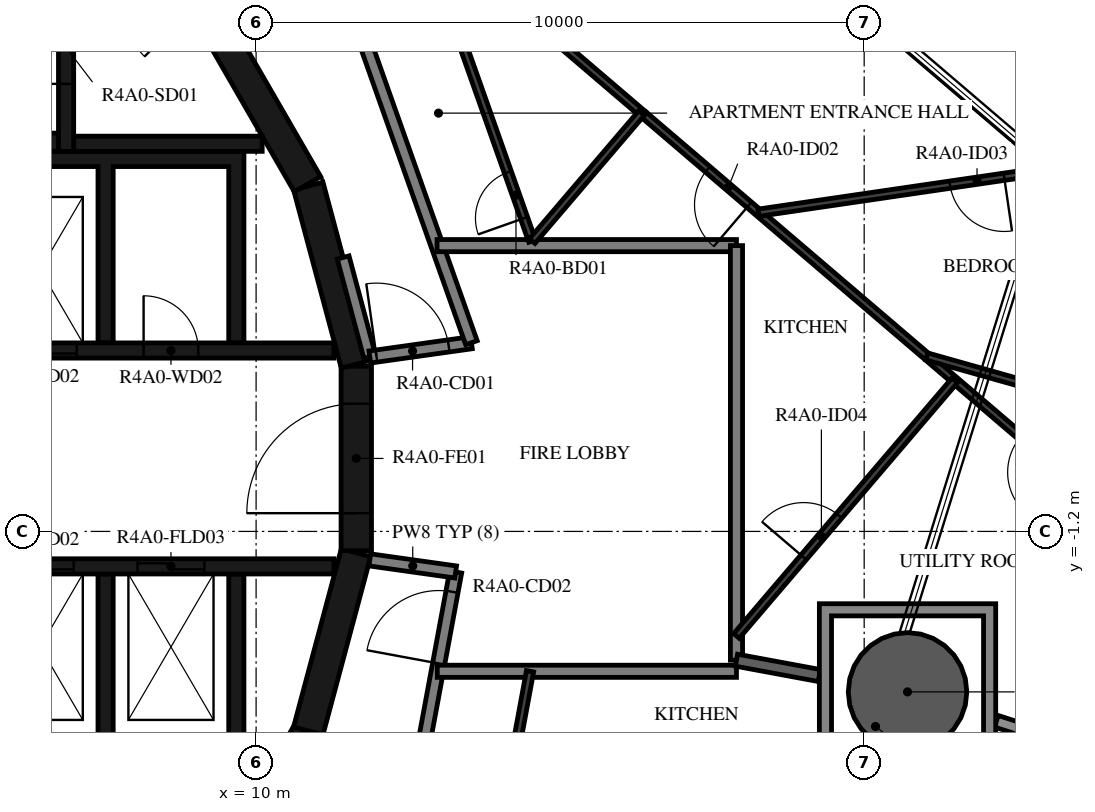
"""IFC4 building model, lengths in metres.
Left out: names, types, materials, properties, quantities, classifications, styles, units other than length and angle.
Written with IfcOpenShell. Run it as: python <this file> out.ifc"""

import sys

from ifc_helpers import new_model, si_unit, direction, frame, frame_2d, origin, origin_2d, place, context, subcontext, project, spatial, polyline, rectangle, hollow_circle, outline, extrude, element, fill, save


model = new_model("IFC4")
c1 = context("Model", 3, precision=1e-05, world=origin(), true_north=direction((0.0, 1.0)))
c2 = subcontext(c1, "Body", "Model", "MODEL_VIEW")
j1 = project(units=[si_unit("LENGTHUNIT", "METRE"), si_unit("PLANEANGLEUNIT", "RADIAN")], contexts=[c1])
p1 = place(None, origin())
s1 = spatial("IfcSite", under=j1, at=p1, CompositionType="ELEMENT")
p2 = place(p1, origin())
s2 = spatial("IfcBuilding", under=s1, at=p2, CompositionType="ELEMENT")
p3 = place(p2, frame((0.0, 0.0, 158.7)))
s3 = spatial("IfcBuildingStorey", under=s2, at=p3, CompositionType="ELEMENT", Elevation=158.7)
p4 = place(p3, frame((20.713, -3.839, -0.38), z_axis=(0.0, 0.0, 1.0), x_axis=(1.0, 0.0, 0.0)))
e1 = element("IfcColumn", 1, at=p4, inside=s3, PredefinedType="COLUMN", context=c2, shape_type="SweptSolid", body=[
    extrude(hollow_circle(Radius=0.975, WallThickness=0.045, at=origin_2d()), origin(), (0.0, 0.0, 1.0), 3.5),
])
for number, where, z_axis, x_axis in (
    (2, (9.329, -7.137, 0.0), (0.0, 0.0, 1.0), (0.5, 0.866, 0.0)),
    (3, (10.858, -4.479, 0.0), (0.0, 0.0, 1.0), (0.259, 0.966, 0.0)),
):
    element("IfcWall", number, at=place(p3, frame(where, z_axis=z_axis, x_axis=x_axis)), inside=s3, PredefinedType="SHEAR", context=c2, shape_type="SweptSolid", body=[
        extrude(rectangle(XDim=3.033, YDim=0.5, at=frame_2d((1.516, 0.0))), origin(), (0.0, 0.0, 1.0), 3.12),
    ])
p5 = place(p3, frame((11.647, -1.516, 0.0), z_axis=(0.0, 0.0, 1.0), x_axis=(0.0, 1.0, 0.0)))
e4 = element("IfcWall", 4, at=p5, inside=s3, PredefinedType="SHEAR", context=c2, shape_type="SweptSolid", body=[
    extrude(rectangle(XDim=3.033, YDim=0.5, at=frame_2d((1.516, 0.0))), origin(), (0.0, 0.0, 1.0), 3.12),
])
p6 = place(p5, frame((0.616, 0.0, 0.0)))
e5 = element("IfcOpeningElement", 5, at=p6, cuts=e4, PredefinedType="OPENING", context=c2, shape_type="SweptSolid", body=[
    extrude(rectangle(XDim=1.8, YDim=2.1, at=frame_2d((0.9, 1.05))), frame((0.0, 0.26, 0.0), z_axis=(0.0, -1.0, 0.0), x_axis=(1.0, 0.0, 0.0)), (0.0, 0.0, 1.0), 0.52),
])
for number, where, z_axis, x_axis in (
    (6, (11.643, 1.55, 0.0), (0.0, 0.0, 1.0), (-0.259, 0.966, 0.0)),
    (7, (10.845, 4.51, 0.0), (0.0, 0.0, 1.0), (-0.5, 0.866, 0.0)),
):
    element("IfcWall", number, at=place(p3, frame(where, z_axis=z_axis, x_axis=x_axis)), inside=s3, PredefinedType="SHEAR", context=c2, shape_type="SweptSolid", body=[
        extrude(rectangle(XDim=3.033, YDim=0.5, at=frame_2d((1.516, 0.0))), origin(), (0.0, 0.0, 1.0), 3.12),
    ])
p7 = place(p3, frame((0.0, 5.2, 0.0), z_axis=(0.0, 0.0, 1.0), x_axis=(1.0, 0.0, 0.0)))
e8 = element("IfcWall", 8, at=p7, inside=s3, PredefinedType="SHEAR", context=c2, shape_type="SweptSolid", body=[
    extrude(rectangle(XDim=6.75, YDim=0.3, at=frame_2d((3.375, 0.0))), origin(), (0.0, 0.0, 1.0), 3.12),
])
p8 = place(p3, frame((6.875, 5.05, 0.0), z_axis=(0.0, 0.0, 1.0), x_axis=(0.0, 1.0, 0.0)))
e9 = element("IfcWall", 9, at=p8, inside=s3, PredefinedType="SHEAR", context=c2, shape_type="SweptSolid", body=[
    extrude(rectangle(XDim=3.92, YDim=0.25, at=frame_2d((1.96, 0.0))), origin(), (0.0, 0.0, 1.0), 3.12),
])
p9 = place(p8, frame((1.11, 0.0, 0.0)))
e10 = element("IfcOpeningElement", 10, at=p9, cuts=e9, PredefinedType="OPENING", context=c2, shape_type="SweptSolid", body=[
    extrude(rectangle(XDim=1.2, YDim=2.1, at=frame_2d((0.6, 1.05))), frame((0.0, 0.135, 0.0), z_axis=(0.0, -1.0, 0.0), x_axis=(1.0, 0.0, 0.0)), (0.0, 0.0, 1.0), 0.27),
])
p10 = place(p3, frame((7.0, 5.175, 0.0), z_axis=(0.0, 0.0, 1.0), x_axis=(1.0, 0.0, 0.0)))
e11 = element("IfcWall", 11, at=p10, inside=s3, PredefinedType="SHEAR", context=c2, shape_type="SweptSolid", body=[
    extrude(rectangle(XDim=3.1, YDim=0.25, at=frame_2d((1.55, 0.0))), origin(), (0.0, 0.0, 1.0), 3.12),
])
p11 = place(p3, origin())
e12 = element("IfcWall", 12, at=p11, inside=s3, PredefinedType="SHEAR", context=c2, shape_type="SweptSolid", body=[
    extrude(outline(polyline([(-9.55, 4.8), (-1.2, 4.8), (-1.2, 1.9), (-0.95, 1.9), (-0.95, 4.8), (0.95, 4.8), (0.95, 1.9), (1.2, 1.9), (1.2, 4.8), (3.1, 4.8), (3.1, 1.9), (3.35, 1.9), (3.35, 4.8), (5.25, 4.8), (5.25, 1.9), (5.5, 1.9), (5.5, 4.8), (7.4, 4.8), (7.4, 1.9), (7.65, 1.9), (7.65, 4.8), (9.55, 4.8), (9.55, 1.9), (9.8, 1.9), (9.8, 4.8), (9.8, 5.05), (-9.8, 5.05), (-9.8, 4.8), (-9.8, 1.9), (-9.55, 1.9), (-9.55, 4.8)])), origin(), (0.0, 0.0, 1.0), 3.12),
])
p12 = place(p3, origin())
e13 = element("IfcWall", 13, at=p12, inside=s3, PredefinedType="SHEAR", context=c2, shape_type="SweptSolid", body=[
    extrude(outline(polyline([(9.8, -5.05), (9.8, -4.8), (9.8, -1.9), (9.55, -1.9), (9.55, -4.8), (7.65, -4.8), (7.65, -1.9), (7.4, -1.9), (7.4, -4.8), (5.5, -4.8), (5.5, -1.9), (5.25, -1.9), (5.25, -4.8), (3.35, -4.8), (3.35, -1.9), (3.1, -1.9), (3.1, -4.8), (1.2, -4.8), (1.2, -1.9), (0.95, -1.9), (0.95, -4.8), (-0.95, -4.8), (-0.95, -1.9), (-1.2, -1.9), (-1.2, -4.8), (-3.1, -4.8), (-3.1, -1.9), (-3.35, -1.9), (-3.35, -4.8), (-5.25, -4.8), (-5.25, -1.9), (-5.5, -1.9), (-5.5, -4.8), (-7.4, -4.8), (-7.4, -1.9), (-7.65, -1.9), (-7.65, -4.8), (-9.55, -4.8), (-9.55, -1.9), (-9.8, -1.9), (-9.8, -4.8), (-9.8, -5.05), (9.8, -5.05)])), origin(), (0.0, 0.0, 1.0), 3.12),
])
p13 = place(p3, frame((3.35, 1.775, 0.0), z_axis=(0.0, 0.0, 1.0), x_axis=(1.0, 0.0, 0.0)))
e14 = element("IfcWall", 14, at=p13, inside=s3, PredefinedType="SHEAR", context=c2, shape_type="SweptSolid", body=[
    extrude(rectangle(XDim=7.93, YDim=0.25, at=frame_2d((3.965, 0.0))), origin(), (0.0, 0.0, 1.0), 3.12),
])
p14 = place(p13, frame((0.35, 0.0, 0.0)))
e15 = element("IfcOpeningElement", 15, at=p14, cuts=e14, PredefinedType="OPENING", context=c2, shape_type="SweptSolid", body=[
    extrude(rectangle(XDim=1.2, YDim=2.4, at=frame_2d((0.6, 1.2))), frame((0.0, 0.135, 0.0), z_axis=(0.0, -1.0, 0.0), x_axis=(1.0, 0.0, 0.0)), (0.0, 0.0, 1.0), 0.27),
])
p15 = place(p13, frame((2.5, 0.0, 0.0)))
e16 = element("IfcOpeningElement", 16, at=p15, cuts=e14, PredefinedType="OPENING", context=c2, shape_type="SweptSolid", body=[
    extrude(rectangle(XDim=1.2, YDim=2.4, at=frame_2d((0.6, 1.2))), frame((0.0, 0.135, 0.0), z_axis=(0.0, -1.0, 0.0), x_axis=(1.0, 0.0, 0.0)), (0.0, 0.0, 1.0), 0.27),
])
p16 = place(p13, frame((4.8, 0.0, 0.0)))
e17 = element("IfcOpeningElement", 17, at=p16, cuts=e14, PredefinedType="OPENING", context=c2, shape_type="SweptSolid", body=[
    extrude(rectangle(XDim=0.9, YDim=2.1, at=frame_2d((0.45, 1.05))), frame((0.0, 0.135, 0.0), z_axis=(0.0, -1.0, 0.0), x_axis=(1.0, 0.0, 0.0)), (0.0, 0.0, 1.0), 0.27),
])
p17 = place(p3, frame((3.35, -1.775, 0.0), z_axis=(0.0, 0.0, 1.0), x_axis=(1.0, 0.0, 0.0)))
e18 = element("IfcWall", 18, at=p17, inside=s3, PredefinedType="SHEAR", context=c2, shape_type="SweptSolid", body=[
    extrude(rectangle(XDim=7.93, YDim=0.25, at=frame_2d((3.965, 0.0))), origin(), (0.0, 0.0, 1.0), 3.12),
])
p18 = place(p17, frame((0.4, 0.0, 0.0)))
e19 = element("IfcOpeningElement", 19, at=p18, cuts=e18, PredefinedType="OPENING", context=c2, shape_type="SweptSolid", body=[
    extrude(rectangle(XDim=1.1, YDim=2.4, at=frame_2d((0.55, 1.2))), frame((0.0, 0.135, 0.0), z_axis=(0.0, -1.0, 0.0), x_axis=(1.0, 0.0, 0.0)), (0.0, 0.0, 1.0), 0.27),
])
p19 = place(p17, frame((2.55, 0.0, 0.0)))
e20 = element("IfcOpeningElement", 20, at=p19, cuts=e18, PredefinedType="OPENING", context=c2, shape_type="SweptSolid", body=[
    extrude(rectangle(XDim=1.1, YDim=2.4, at=frame_2d((0.55, 1.2))), frame((0.0, 0.135, 0.0), z_axis=(0.0, -1.0, 0.0), x_axis=(1.0, 0.0, 0.0)), (0.0, 0.0, 1.0), 0.27),
])
p20 = place(p17, frame((4.7, 0.0, 0.0)))
e21 = element("IfcOpeningElement", 21, at=p20, cuts=e18, PredefinedType="OPENING", context=c2, shape_type="SweptSolid", body=[
    extrude(rectangle(XDim=1.1, YDim=2.4, at=frame_2d((0.55, 1.2))), frame((0.0, 0.135, 0.0), z_axis=(0.0, -1.0, 0.0), x_axis=(1.0, 0.0, 0.0)), (0.0, 0.0, 1.0), 0.27),
])
p21 = place(p3, frame((11.87, 1.668, 0.0), z_axis=(0.0, 0.0, 1.0), x_axis=(-0.258836880648, 0.965921047093, 0.0)))
e22 = element("IfcWall", 22, at=p21, inside=s3, PredefinedType="STANDARD", context=c2, shape_type="SweptSolid", body=[
    extrude(rectangle(XDim=1.695, YDim=0.2, at=frame_2d((0.848, 0.0))), origin(), (0.0, 0.0, 1.0), 3.12),
])
p22 = place(p3, frame((11.87, 1.668, 0.0), z_axis=(0.0, 0.0, 1.0), x_axis=(0.990270910415, 0.139152879904, 0.0)))
e23 = element("IfcWall", 23, at=p22, inside=s3, PredefinedType="STANDARD", context=c2, shape_type="SweptSolid", body=[
    extrude(rectangle(XDim=1.688, YDim=0.2, at=frame_2d((0.844, 0.0))), origin(), (0.0, 0.0, 1.0), 3.12),
])
p23 = place(p22, frame((0.11, 0.0, 0.0)))
e24 = element("IfcOpeningElement", 24, at=p23, cuts=e23, PredefinedType="OPENING", context=c2, shape_type="SweptSolid", body=[
    extrude(rectangle(XDim=1.2, YDim=2.1, at=frame_2d((0.6, 1.05))), frame((0.0, 0.11, 0.0), z_axis=(0.0, -1.0, 0.0), x_axis=(1.0, 0.0, 0.0)), (0.0, 0.0, 1.0), 0.22),
])
p24 = place(p3, frame((13.542, 1.903, 0.0), z_axis=(0.0, 0.0, 1.0), x_axis=(-0.333808508206, 0.942640907159, 0.0)))
e25 = element("IfcWall", 25, at=p24, inside=s3, PredefinedType="STANDARD", context=c2, shape_type="SweptSolid", body=[
    extrude(rectangle(XDim=6.317, YDim=0.2, at=frame_2d((3.158, 0.0))), origin(), (0.0, 0.0, 1.0), 3.12),
])
p25 = place(p3, frame((12.521, -5.972, 0.0), z_axis=(0.0, 0.0, 1.0), x_axis=(0.182244189886, 0.983253301674, 0.0)))
e26 = element("IfcWall", 26, at=p25, inside=s3, PredefinedType="STANDARD", context=c2, shape_type="SweptSolid", body=[
    extrude(rectangle(XDim=4.176, YDim=0.2, at=frame_2d((2.088, 0.0))), origin(), (0.0, 0.0, 1.0), 3.12),
])
p26 = place(p25, frame((2.645, 0.0, 0.0)))
e27 = element("IfcOpeningElement", 27, at=p26, cuts=e26, PredefinedType="OPENING", context=c2, shape_type="SweptSolid", body=[
    extrude(rectangle(XDim=1.2, YDim=2.1, at=frame_2d((0.6, 1.05))), frame((0.0, 0.11, 0.0), z_axis=(0.0, -1.0, 0.0), x_axis=(1.0, 0.0, 0.0)), (0.0, 0.0, 1.0), 0.22),
])
p27 = place(p3, frame((13.282, -1.867, 0.0), z_axis=(0.0, 0.0, 1.0), x_axis=(-0.990265430288, 0.139191873241, 0.0)))
e28 = element("IfcWall", 28, at=p27, inside=s3, PredefinedType="STANDARD", context=c2, shape_type="SweptSolid", body=[
    extrude(rectangle(XDim=1.426, YDim=0.2, at=frame_2d((0.713, 0.0))), origin(), (0.0, 0.0, 1.0), 3.12),
])
p28 = place(p3, frame((17.9, 3.5, 0.0), z_axis=(0.0, 0.0, 1.0), x_axis=(-1.0, 0.0, 0.0)))
e29 = element("IfcWall", 29, at=p28, inside=s3, PredefinedType="STANDARD", context=c2, shape_type="SweptSolid", body=[
    extrude(rectangle(XDim=4.924, YDim=0.2, at=frame_2d((2.462, 0.0))), origin(), (0.0, 0.0, 1.0), 3.12),
])
p29 = place(p3, frame((17.9, -3.318, 0.0), z_axis=(0.0, 0.0, 1.0), x_axis=(0.0, 1.0, 0.0)))
e30 = element("IfcWall", 30, at=p29, inside=s3, PredefinedType="STANDARD", context=c2, shape_type="SweptSolid", body=[
    extrude(rectangle(XDim=6.818, YDim=0.2, at=frame_2d((3.409, 0.0))), origin(), (0.0, 0.0, 1.0), 3.12),
])
p30 = place(p3, frame((12.979, -3.5, 0.0), z_axis=(0.0, 0.0, 1.0), x_axis=(1.0, 0.0, 0.0)))
e31 = element("IfcWall", 31, at=p30, inside=s3, PredefinedType="STANDARD", context=c2, shape_type="SweptSolid", body=[
    extrude(rectangle(XDim=4.92, YDim=0.2, at=frame_2d((2.46, 0.0))), origin(), (0.0, 0.0, 1.0), 3.12),
])
p31 = place(p3, frame((22.173, -4.322, 0.0), z_axis=(0.0, 0.0, 1.0), x_axis=(0.951906405572, -0.306388960362, 0.0)))
e32 = element("IfcWall", 32, at=p31, inside=s3, PredefinedType="STANDARD", context=c2, shape_type="SweptSolid", body=[
    extrude(rectangle(XDim=6.45, YDim=0.2, at=frame_2d((3.225, 0.0))), origin(), (0.0, 0.0, 1.0), 2.73),
])
p32 = place(p3, frame((17.9, -3.318, 0.0), z_axis=(0.0, 0.0, 1.0), x_axis=(0.983252800712, -0.182246892682, 0.0)))
e33 = element("IfcWall", 33, at=p32, inside=s3, PredefinedType="STANDARD", context=c2, shape_type="SweptSolid", body=[
    extrude(rectangle(XDim=1.386, YDim=0.2, at=frame_2d((0.693, 0.0))), origin(), (0.0, 0.0, 1.0), 3.12),
])
p33 = place(p3, frame((14.541, 3.575, 0.0), z_axis=(0.0, 0.0, 1.0), x_axis=(-0.333799280318, 0.942644174893, 0.0)))
e34 = element("IfcWall", 34, at=p33, inside=s3, PredefinedType="PARTITIONING", context=c2, shape_type="SweptSolid", body=[
    extrude(rectangle(XDim=5.477, YDim=0.12, at=frame_2d((2.738, 0.0))), origin(), (0.0, 0.0, 1.0), 3.12),
])
p34 = place(p33, frame((0.4, 0.0, 0.0)))
e35 = element("IfcOpeningElement", 35, at=p34, cuts=e34, PredefinedType="OPENING", context=c2, shape_type="SweptSolid", body=[
    extrude(rectangle(XDim=0.8, YDim=2.1, at=frame_2d((0.4, 1.05))), frame((0.0, 0.07, 0.0), z_axis=(0.0, -1.0, 0.0), x_axis=(1.0, 0.0, 0.0)), (0.0, 0.0, 1.0), 0.14),
])
p35 = place(p3, frame((12.734, 8.762, 0.0), z_axis=(0.0, 0.0, 1.0), x_axis=(0.760390484255, -0.649466174219, 0.0)))
e36 = element("IfcWall", 36, at=p35, inside=s3, PredefinedType="PARTITIONING", context=c2, shape_type="SweptSolid", body=[
    extrude(rectangle(XDim=4.783, YDim=0.12, at=frame_2d((2.391, 0.0))), origin(), (0.0, 0.0, 1.0), 3.12),
])
p36 = place(p3, frame((23.411, -0.357, 0.0), z_axis=(0.0, 0.0, 1.0), x_axis=(-0.76041871148, 0.649433124525, 0.0)))
e37 = element("IfcWall", 37, at=p36, inside=s3, PredefinedType="PARTITIONING", context=c2, shape_type="SweptSolid", body=[
    extrude(rectangle(XDim=9.259, YDim=0.12, at=frame_2d((4.629, 0.0))), origin(), (0.0, 0.0, 1.0), 3.12),
])
p37 = place(p36, frame((6.972, 0.0, 0.0)))
e38 = element("IfcOpeningElement", 38, at=p37, cuts=e37, PredefinedType="OPENING", context=c2, shape_type="SweptSolid", body=[
    extrude(rectangle(XDim=0.9, YDim=2.1, at=frame_2d((0.45, 1.05))), frame((0.0, 0.07, 0.0), z_axis=(0.0, -1.0, 0.0), x_axis=(1.0, 0.0, 0.0)), (0.0, 0.0, 1.0), 0.14),
])
p38 = place(p36, frame((0.2, 0.0, 0.0)))
e39 = element("IfcOpeningElement", 39, at=p38, cuts=e37, PredefinedType="OPENING", context=c2, shape_type="SweptSolid", body=[
    extrude(rectangle(XDim=0.9, YDim=2.1, at=frame_2d((0.45, 1.05))), frame((0.0, 0.07, 0.0), z_axis=(0.0, -1.0, 0.0), x_axis=(1.0, 0.0, 0.0)), (0.0, 0.0, 1.0), 0.14),
])
p39 = place(p3, frame((16.341, 5.682, 0.0), z_axis=(0.0, 0.0, 1.0), x_axis=(-0.64946993237, -0.76038727432, 0.0)))
e40 = element("IfcWall", 40, at=p39, inside=s3, PredefinedType="PARTITIONING", context=c2, shape_type="SweptSolid", body=[
    extrude(rectangle(XDim=2.771, YDim=0.12, at=frame_2d((1.386, 0.0))), origin(), (0.0, 0.0, 1.0), 3.12),
])
p40 = place(p3, frame((17.9, -2.918, 0.0), z_axis=(0.0, 0.0, 1.0), x_axis=(0.649469887983, 0.760387312232, 0.0)))
e41 = element("IfcWall", 41, at=p40, inside=s3, PredefinedType="PARTITIONING", context=c2, shape_type="SweptSolid", body=[
    extrude(rectangle(XDim=5.527, YDim=0.12, at=frame_2d((2.763, 0.0))), origin(), (0.0, 0.0, 1.0), 3.12),
])
p41 = place(p40, frame((1.7, 0.0, 0.0)))
e42 = element("IfcOpeningElement", 42, at=p41, cuts=e41, PredefinedType="OPENING", context=c2, shape_type="SweptSolid", body=[
    extrude(rectangle(XDim=0.9, YDim=2.1, at=frame_2d((0.45, 1.05))), frame((0.0, 0.07, 0.0), z_axis=(0.0, -1.0, 0.0), x_axis=(1.0, 0.0, 0.0)), (0.0, 0.0, 1.0), 0.14),
])
p42 = place(p3, frame((22.994, 4.734, 0.0), z_axis=(0.0, 0.0, 1.0), x_axis=(-0.989449286977, -0.144879634529, 0.0)))
e43 = element("IfcWall", 43, at=p42, inside=s3, PredefinedType="PARTITIONING", context=c2, shape_type="SweptSolid", body=[
    extrude(rectangle(XDim=4.782, YDim=0.12, at=frame_2d((2.391, 0.0))), origin(), (0.0, 0.0, 1.0), 3.12),
])
p43 = place(p42, frame((0.7, 0.0, 0.0)))
e44 = element("IfcOpeningElement", 44, at=p43, cuts=e43, PredefinedType="OPENING", context=c2, shape_type="SweptSolid", body=[
    extrude(rectangle(XDim=0.9, YDim=2.1, at=frame_2d((0.45, 1.05))), frame((0.0, 0.07, 0.0), z_axis=(0.0, -1.0, 0.0), x_axis=(1.0, 0.0, 0.0)), (0.0, 0.0, 1.0), 0.14),
])
p44 = place(p3, frame((21.029, 1.677, 0.0), z_axis=(0.0, 0.0, 1.0), x_axis=(0.962458274539, -0.271429677396, 0.0)))
e45 = element("IfcWall", 45, at=p44, inside=s3, PredefinedType="PARTITIONING", context=c2, shape_type="SweptSolid", body=[
    extrude(rectangle(XDim=7.037, YDim=0.12, at=frame_2d((3.519, 0.0))), origin(), (0.0, 0.0, 1.0), 3.12),
])
p45 = place(p3, frame((14.24, -4.928, 0.0), z_axis=(0.0, 0.0, 1.0), x_axis=(0.182329957282, 0.983237400976, 0.0)))
e46 = element("IfcWall", 46, at=p45, inside=s3, PredefinedType="PARTITIONING", context=c2, shape_type="SweptSolid", body=[
    extrude(rectangle(XDim=1.453, YDim=0.12, at=frame_2d((0.727, 0.0))), origin(), (0.0, 0.0, 1.0), 3.12),
])
p46 = place(p3, origin())
e47 = element("IfcWall", 47, at=p46, inside=s3, PredefinedType="STANDARD", context=c2, shape_type="SweptSolid", body=[
    extrude(outline(polyline([(22.163, -2.389), (22.163, -5.289), (19.263, -5.289), (19.263, -2.389), (22.163, -2.389)]), holes=[polyline([(19.463, -5.089), (21.963, -5.089), (21.963, -2.589), (19.463, -2.589), (19.463, -5.089)])]), origin(), (0.0, 0.0, 1.0), 3.12),
])
p47 = place(p9, origin())
e48 = element("IfcDoor", 48, at=p47, inside=s3, OperationType="SINGLE_SWING_LEFT", PredefinedType="DOOR", context=c2, shape_type="SweptSolid", body=[
    extrude(rectangle(XDim=1.2, YDim=2.1, at=frame_2d((0.6, 1.05))), frame((0.0, 0.025, 0.0), z_axis=(0.0, -1.0, 0.0), x_axis=(1.0, 0.0, 0.0)), (0.0, 0.0, 1.0), 0.05),
])
fill(e10, e48)
p48 = place(p6, origin())
e49 = element("IfcDoor", 49, at=p48, inside=s3, OperationType="DOUBLE_DOOR_SINGLE_SWING", PredefinedType="DOOR", context=c2, shape_type="SweptSolid", body=[
    extrude(rectangle(XDim=1.8, YDim=2.1, at=frame_2d((0.9, 1.05))), frame((0.0, 0.025, 0.0), z_axis=(0.0, -1.0, 0.0), x_axis=(1.0, 0.0, 0.0)), (0.0, 0.0, 1.0), 0.05),
])
fill(e5, e49)
p49 = place(p15, origin())
e50 = element("IfcDoor", 50, at=p49, inside=s3, OperationType="DOUBLE_DOOR_SLIDING", PredefinedType="DOOR", context=c2, shape_type="SweptSolid", body=[
    extrude(rectangle(XDim=1.2, YDim=2.4, at=frame_2d((0.6, 1.2))), frame((0.0, 0.025, 0.0), z_axis=(0.0, -1.0, 0.0), x_axis=(1.0, 0.0, 0.0)), (0.0, 0.0, 1.0), 0.05),
])
fill(e16, e50)
p50 = place(p19, origin())
e51 = element("IfcDoor", 51, at=p50, inside=s3, OperationType="DOUBLE_DOOR_SLIDING", PredefinedType="DOOR", context=c2, shape_type="SweptSolid", body=[
    extrude(rectangle(XDim=1.1, YDim=2.4, at=frame_2d((0.55, 1.2))), frame((0.0, 0.025, 0.0), z_axis=(0.0, -1.0, 0.0), x_axis=(1.0, 0.0, 0.0)), (0.0, 0.0, 1.0), 0.05),
])
fill(e20, e51)
p51 = place(p20, origin())
e52 = element("IfcDoor", 52, at=p51, inside=s3, OperationType="DOUBLE_DOOR_SLIDING", PredefinedType="DOOR", context=c2, shape_type="SweptSolid", body=[
    extrude(rectangle(XDim=1.1, YDim=2.4, at=frame_2d((0.55, 1.2))), frame((0.0, 0.025, 0.0), z_axis=(0.0, -1.0, 0.0), x_axis=(1.0, 0.0, 0.0)), (0.0, 0.0, 1.0), 0.05),
])
fill(e21, e52)
p52 = place(p16, origin())
e53 = element("IfcDoor", 53, at=p52, inside=s3, OperationType="SINGLE_SWING_RIGHT", PredefinedType="DOOR", context=c2, shape_type="SweptSolid", body=[
    extrude(rectangle(XDim=0.9, YDim=2.1, at=frame_2d((0.45, 1.05))), frame((0.0, 0.025, 0.0), z_axis=(0.0, -1.0, 0.0), x_axis=(1.0, 0.0, 0.0)), (0.0, 0.0, 1.0), 0.05),
])
fill(e17, e53)
p53 = place(p34, origin())
e54 = element("IfcDoor", 54, at=p53, inside=s3, OperationType="SINGLE_SWING_LEFT", PredefinedType="DOOR", context=c2, shape_type="SweptSolid", body=[
    extrude(rectangle(XDim=0.8, YDim=2.1, at=frame_2d((0.4, 1.05))), frame((0.0, 0.025, 0.0), z_axis=(0.0, -1.0, 0.0), x_axis=(1.0, 0.0, 0.0)), (0.0, 0.0, 1.0), 0.05),
])
fill(e35, e54)
p54 = place(p37, origin())
e55 = element("IfcDoor", 55, at=p54, inside=s3, OperationType="SINGLE_SWING_RIGHT", PredefinedType="DOOR", context=c2, shape_type="SweptSolid", body=[
    extrude(rectangle(XDim=0.9, YDim=2.1, at=frame_2d((0.45, 1.05))), frame((0.0, 0.025, 0.0), z_axis=(0.0, -1.0, 0.0), x_axis=(1.0, 0.0, 0.0)), (0.0, 0.0, 1.0), 0.05),
])
fill(e38, e55)
p55 = place(p43, origin())
e56 = element("IfcDoor", 56, at=p55, inside=s3, OperationType="SINGLE_SWING_LEFT", PredefinedType="DOOR", context=c2, shape_type="SweptSolid", body=[
    extrude(rectangle(XDim=0.9, YDim=2.1, at=frame_2d((0.45, 1.05))), frame((0.0, 0.025, 0.0), z_axis=(0.0, -1.0, 0.0), x_axis=(1.0, 0.0, 0.0)), (0.0, 0.0, 1.0), 0.05),
])
fill(e44, e56)
p56 = place(p41, origin())
e57 = element("IfcDoor", 57, at=p56, inside=s3, OperationType="SINGLE_SWING_LEFT", PredefinedType="DOOR", context=c2, shape_type="SweptSolid", body=[
    extrude(rectangle(XDim=0.9, YDim=2.1, at=frame_2d((0.45, 1.05))), frame((0.0, 0.025, 0.0), z_axis=(0.0, -1.0, 0.0), x_axis=(1.0, 0.0, 0.0)), (0.0, 0.0, 1.0), 0.05),
])
fill(e42, e57)
p57 = place(p23, origin())
e58 = element("IfcDoor", 58, at=p57, inside=s3, OperationType="DOUBLE_DOOR_SINGLE_SWING", PredefinedType="DOOR", context=c2, shape_type="SweptSolid", body=[
    extrude(rectangle(XDim=1.2, YDim=2.1, at=frame_2d((0.6, 1.05))), frame((0.0, 0.025, 0.0), z_axis=(0.0, -1.0, 0.0), x_axis=(1.0, 0.0, 0.0)), (0.0, 0.0, 1.0), 0.05),
])
fill(e24, e58)
p58 = place(p26, origin())
e59 = element("IfcDoor", 59, at=p58, inside=s3, OperationType="DOUBLE_DOOR_SINGLE_SWING", PredefinedType="DOOR", context=c2, shape_type="SweptSolid", body=[
    extrude(rectangle(XDim=1.2, YDim=2.1, at=frame_2d((0.6, 1.05))), frame((0.0, 0.025, 0.0), z_axis=(0.0, -1.0, 0.0), x_axis=(1.0, 0.0, 0.0)), (0.0, 0.0, 1.0), 0.05),
])
fill(e27, e59)
save(model, sys.argv[1])
